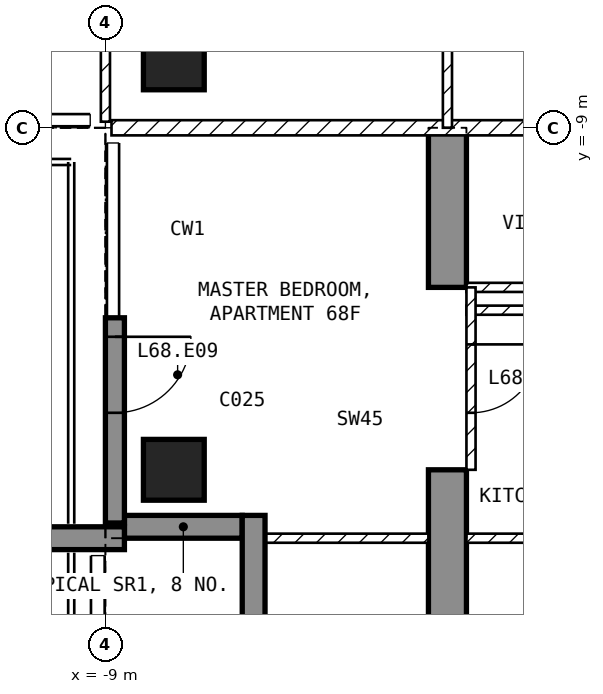
"""IFC4 building model, lengths in metres.
Left out: names, types, materials, properties, quantities, classifications, styles, units other than length and angle.
Written with IfcOpenShell. Run it as: python <this file> out.ifc"""

import sys

from ifc_helpers import new_model, si_unit, direction, frame, frame_2d, origin, origin_2d, place, context, subcontext, project, spatial, polyline, rectangle, outline, extrude, element, fill, save


model = new_model("IFC4")
c1 = context("Model", 3, precision=1e-05, world=origin(), true_north=direction((0.0, 1.0)))
c2 = subcontext(c1, "Body", "Model", "MODEL_VIEW")
j1 = project(units=[si_unit("LENGTHUNIT", "METRE"), si_unit("PLANEANGLEUNIT", "RADIAN")], contexts=[c1])
p1 = place(None, origin())
s1 = spatial("IfcSite", under=j1, at=p1, CompositionType="ELEMENT")
p2 = place(p1, origin())
s2 = spatial("IfcBuilding", under=s1, at=p2, CompositionType="ELEMENT")
p3 = place(p2, frame((0.0, 0.0, 267.5)))
s3 = spatial("IfcBuildingStorey", under=s2, at=p3, CompositionType="ELEMENT", Elevation=267.5)
for number, where, z_axis, x_axis in (
    (1, (-8.1, -13.5, -0.25), (0.0, 0.0, 1.0), (1.0, 0.0, 0.0)),
    (2, (-8.1, -8.1, -0.25), (0.0, 0.0, 1.0), (1.0, 0.0, 0.0)),
):
    element("IfcColumn", number, at=place(p3, frame(where, z_axis=z_axis, x_axis=x_axis)), inside=s3, PredefinedType="COLUMN", context=c2, shape_type="SweptSolid", body=[
        extrude(rectangle(XDim=0.8, YDim=0.8, at=origin_2d()), origin(), (0.0, 0.0, 1.0), 3.5),
    ])
p4 = place(p3, frame((-4.75, -16.7, -0.25), z_axis=(1.0, 0.0, 0.0), x_axis=(0.0, 1.0, 0.0)))
e3 = element("IfcWall", 3, at=p4, inside=s3, PredefinedType="SHEAR", context=c2, shape_type="SweptSolid", body=[
    extrude(outline(polyline([(0.0, 0.0), (3.2, 0.0), (3.2, 2.65), (5.6, 2.65), (5.6, 0.0), (7.7, 0.0), (7.7, 3.5), (0.0, 3.5), (0.0, 0.0)])), origin(), (0.0, 0.0, 1.0), 0.5),
])
p5 = place(p3, frame((-8.875, -11.5, 0.0), z_axis=(0.0, 0.0, 1.0), x_axis=(0.0, -1.0, 0.0)))
e4 = element("IfcWall", 4, at=p5, inside=s3, PredefinedType="SOLIDWALL", context=c2, shape_type="SweptSolid", body=[
    extrude(rectangle(XDim=2.7, YDim=0.25, at=frame_2d((1.35, 0.0))), origin(), (0.0, 0.0, 1.0), 3.25),
])
p6 = place(p5, frame((0.25, 0.0, 0.0)))
e5 = element("IfcOpeningElement", 5, at=p6, cuts=e4, PredefinedType="OPENING", context=c2, shape_type="SweptSolid", body=[
    extrude(rectangle(XDim=1.0, YDim=2.4, at=frame_2d((0.5, 1.2))), frame((0.0, 0.135, 0.0), z_axis=(0.0, -1.0, 0.0), x_axis=(1.0, 0.0, 0.0)), (0.0, 0.0, 1.0), 0.27),
])
p7 = place(p3, frame((-8.75, -14.25, 0.0), z_axis=(0.0, 0.0, 1.0), x_axis=(1.0, 0.0, 0.0)))
e6 = element("IfcWall", 6, at=p7, inside=s3, PredefinedType="SOLIDWALL", context=c2, shape_type="SweptSolid", body=[
    extrude(rectangle(XDim=1.55, YDim=0.3, at=frame_2d((0.775, 0.0))), origin(), (0.0, 0.0, 1.0), 3.25),
])
p8 = place(p3, frame((-7.05, -14.1, 0.0), z_axis=(0.0, 0.0, 1.0), x_axis=(0.0, -1.0, 0.0)))
e7 = element("IfcWall", 7, at=p8, inside=s3, PredefinedType="SOLIDWALL", context=c2, shape_type="SweptSolid", body=[
    extrude(rectangle(XDim=1.8, YDim=0.3, at=frame_2d((0.9, 0.0))), origin(), (0.0, 0.0, 1.0), 3.25),
])
p9 = place(p3, frame((-8.75, -14.4, 0.0), z_axis=(0.0, 0.0, 1.0), x_axis=(-1.0, 0.0, 0.0)))
e8 = element("IfcWall", 8, at=p9, inside=s3, PredefinedType="SOLIDWALL", context=c2, shape_type="SweptSolid", body=[
    extrude(rectangle(XDim=2.95, YDim=0.3, at=frame_2d((1.475, 0.0))), origin(), (0.0, 0.0, 1.0), 3.25),
])
p10 = place(p3, frame((8.92, -9.0, 0.0), z_axis=(0.0, 0.0, 1.0), x_axis=(-1.0, 0.0, 0.0)))
e9 = element("IfcWall", 9, at=p10, inside=s3, PredefinedType="PARTITIONING", context=c2, shape_type="SweptSolid", body=[
    extrude(rectangle(XDim=17.84, YDim=0.2, at=frame_2d((8.92, 0.0))), origin(), (0.0, 0.0, 1.0), 3.25),
])
p11 = place(p10, frame((8.42, 0.0, 0.0)))
e10 = element("IfcOpeningElement", 10, at=p11, cuts=e9, PredefinedType="OPENING", context=c2, shape_type="SweptSolid", body=[
    extrude(rectangle(XDim=1.0, YDim=2.1, at=frame_2d((0.5, 1.05))), frame((0.0, 0.11, 0.0), z_axis=(0.0, -1.0, 0.0), x_axis=(1.0, 0.0, 0.0)), (0.0, 0.0, 1.0), 0.22),
])
p12 = place(p3, frame((-9.0, -3.0, 0.0), z_axis=(0.0, 0.0, 1.0), x_axis=(0.0, -1.0, 0.0)))
e11 = element("IfcWall", 11, at=p12, inside=s3, PredefinedType="PARTITIONING", context=c2, shape_type="SweptSolid", body=[
    extrude(rectangle(XDim=5.92, YDim=0.12, at=frame_2d((2.96, 0.0))), origin(), (0.0, 0.0, 1.0), 3.25),
])
p13 = place(p12, frame((2.4, 0.0, 0.0)))
e12 = element("IfcOpeningElement", 12, at=p13, cuts=e11, PredefinedType="OPENING", context=c2, shape_type="SweptSolid", body=[
    extrude(rectangle(XDim=0.9, YDim=2.1, at=frame_2d((0.45, 1.05))), frame((0.0, 0.07, 0.0), z_axis=(0.0, -1.0, 0.0), x_axis=(1.0, 0.0, 0.0)), (0.0, 0.0, 1.0), 0.14),
])
p14 = place(p3, frame((-4.5, -4.5, 0.0), z_axis=(0.0, 0.0, 1.0), x_axis=(0.0, -1.0, 0.0)))
e13 = element("IfcWall", 13, at=p14, inside=s3, PredefinedType="PARTITIONING", context=c2, shape_type="SweptSolid", body=[
    extrude(rectangle(XDim=4.5, YDim=0.12, at=frame_2d((2.25, 0.0))), origin(), (0.0, 0.0, 1.0), 3.25),
])
p15 = place(p14, frame((1.8, 0.0, 0.0)))
e14 = element("IfcOpeningElement", 14, at=p15, cuts=e13, PredefinedType="OPENING", context=c2, shape_type="SweptSolid", body=[
    extrude(rectangle(XDim=0.9, YDim=2.1, at=frame_2d((0.45, 1.05))), frame((0.0, 0.07, 0.0), z_axis=(0.0, -1.0, 0.0), x_axis=(1.0, 0.0, 0.0)), (0.0, 0.0, 1.0), 0.14),
])
p16 = place(p3, frame((2.1, -11.1, 0.0), z_axis=(0.0, 0.0, 1.0), x_axis=(-1.0, 0.0, 0.0)))
e15 = element("IfcWall", 15, at=p16, inside=s3, PredefinedType="PARTITIONING", context=c2, shape_type="SweptSolid", body=[
    extrude(rectangle(XDim=6.35, YDim=0.12, at=frame_2d((3.175, 0.0))), origin(), (0.0, 0.0, 1.0), 3.25),
])
p17 = place(p16, frame((1.625, 0.0, 0.0)))
e16 = element("IfcOpeningElement", 16, at=p17, cuts=e15, PredefinedType="OPENING", context=c2, shape_type="SweptSolid", body=[
    extrude(rectangle(XDim=0.9, YDim=2.1, at=frame_2d((0.45, 1.05))), frame((0.0, 0.07, 0.0), z_axis=(0.0, -1.0, 0.0), x_axis=(1.0, 0.0, 0.0)), (0.0, 0.0, 1.0), 0.14),
])
p18 = place(p3, frame((-0.44, -11.4, 0.0), z_axis=(0.0, 0.0, 1.0), x_axis=(-1.0, 0.0, 0.0)))
e17 = element("IfcWall", 17, at=p18, inside=s3, PredefinedType="PARTITIONING", context=c2, shape_type="SweptSolid", body=[
    extrude(rectangle(XDim=3.81, YDim=0.12, at=frame_2d((1.905, 0.0))), origin(), (0.0, 0.0, 1.0), 3.25),
])
p19 = place(p3, frame((4.25, -14.4, 0.0), z_axis=(0.0, 0.0, 1.0), x_axis=(-1.0, 0.0, 0.0)))
e18 = element("IfcWall", 18, at=p19, inside=s3, PredefinedType="PARTITIONING", context=c2, shape_type="SweptSolid", body=[
    extrude(rectangle(XDim=8.5, YDim=0.12, at=frame_2d((4.25, 0.0))), origin(), (0.0, 0.0, 1.0), 3.25),
])
p20 = place(p19, frame((1.925, 0.0, 0.0)))
e19 = element("IfcOpeningElement", 19, at=p20, cuts=e18, PredefinedType="OPENING", context=c2, shape_type="SweptSolid", body=[
    extrude(rectangle(XDim=0.9, YDim=2.1, at=frame_2d((0.45, 1.05))), frame((0.0, 0.07, 0.0), z_axis=(0.0, -1.0, 0.0), x_axis=(1.0, 0.0, 0.0)), (0.0, 0.0, 1.0), 0.14),
])
p21 = place(p3, frame((-4.75, -14.4, 0.0), z_axis=(0.0, 0.0, 1.0), x_axis=(-1.0, 0.0, 0.0)))
e20 = element("IfcWall", 20, at=p21, inside=s3, PredefinedType="PARTITIONING", context=c2, shape_type="SweptSolid", body=[
    extrude(rectangle(XDim=2.37, YDim=0.12, at=frame_2d((1.185, 0.0))), origin(), (0.0, 0.0, 1.0), 3.25),
])
p22 = place(p3, frame((-4.19, -11.1, 0.0), z_axis=(0.0, 0.0, 1.0), x_axis=(0.0, -1.0, 0.0)))
e21 = element("IfcWall", 21, at=p22, inside=s3, PredefinedType="PARTITIONING", context=c2, shape_type="SweptSolid", body=[
    extrude(rectangle(XDim=2.4, YDim=0.12, at=frame_2d((1.2, 0.0))), origin(), (0.0, 0.0, 1.0), 2.4),
])
p23 = place(p22, frame((0.75, 0.0, 0.0)))
e22 = element("IfcOpeningElement", 22, at=p23, cuts=e21, PredefinedType="OPENING", context=c2, shape_type="SweptSolid", body=[
    extrude(rectangle(XDim=0.9, YDim=2.1, at=frame_2d((0.45, 1.05))), frame((0.0, 0.07, 0.0), z_axis=(0.0, -1.0, 0.0), x_axis=(1.0, 0.0, 0.0)), (0.0, 0.0, 1.0), 0.14),
])
p24 = place(p6, origin())
e23 = element("IfcDoor", 23, at=p24, inside=s3, OperationType="SINGLE_SWING_LEFT", PredefinedType="DOOR", context=c2, shape_type="SweptSolid", body=[
    extrude(rectangle(XDim=1.0, YDim=2.4, at=frame_2d((0.5, 1.2))), frame((0.0, 0.025, 0.0), z_axis=(0.0, -1.0, 0.0), x_axis=(1.0, 0.0, 0.0)), (0.0, 0.0, 1.0), 0.05),
])
fill(e5, e23)
p25 = place(p23, origin())
e24 = element("IfcDoor", 24, at=p25, inside=s3, OperationType="SINGLE_SWING_LEFT", PredefinedType="DOOR", context=c2, shape_type="SweptSolid", body=[
    extrude(rectangle(XDim=0.9, YDim=2.1, at=frame_2d((0.45, 1.05))), frame((0.0, 0.025, 0.0), z_axis=(0.0, -1.0, 0.0), x_axis=(1.0, 0.0, 0.0)), (0.0, 0.0, 1.0), 0.05),
])
fill(e22, e24)
save(model, sys.argv[1])
